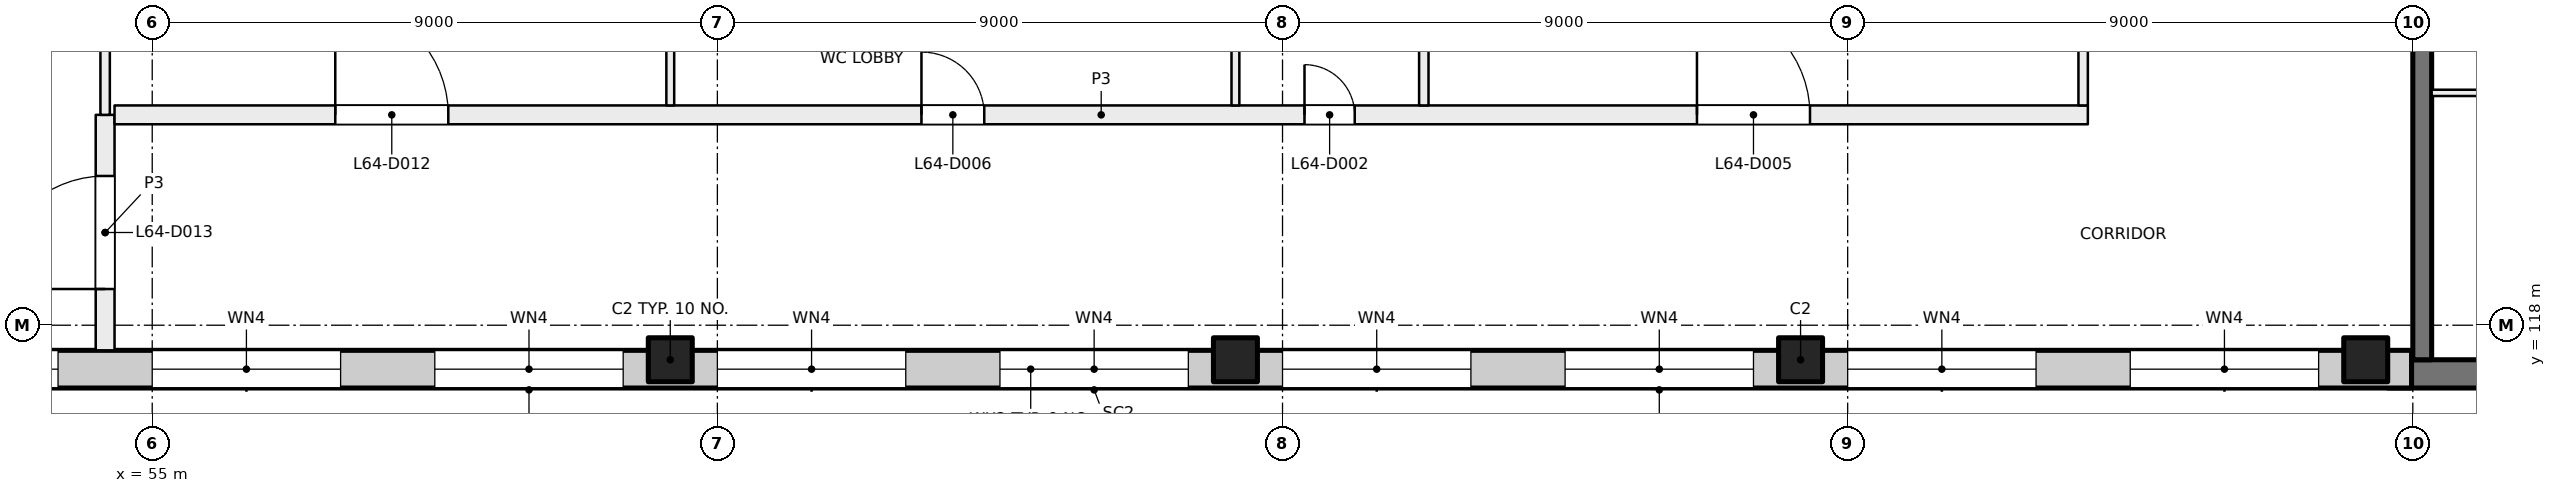
"""IFC4 building model, lengths in metres.
Left out: names, types, materials, properties, quantities, classifications, styles, units other than length and angle.
Written with IfcOpenShell. Run it as: python <this file> out.ifc"""

import sys

from ifc_helpers import new_model, si_unit, direction, frame, frame_2d, origin, origin_2d, place, context, subcontext, project, spatial, rectangle, extrude, element, fill, save


model = new_model("IFC4")
c1 = context("Model", 3, precision=1e-05, world=origin(), true_north=direction((0.0, 1.0)))
c2 = subcontext(c1, "Body", "Model", "MODEL_VIEW")
j1 = project(units=[si_unit("LENGTHUNIT", "METRE"), si_unit("PLANEANGLEUNIT", "RADIAN")], contexts=[c1])
p1 = place(None, origin())
s1 = spatial("IfcSite", under=j1, at=p1, CompositionType="ELEMENT")
p2 = place(p1, origin())
s2 = spatial("IfcBuilding", under=s1, at=p2, CompositionType="ELEMENT")
p3 = place(p2, frame((0.0, 0.0, 269.5)))
s3 = spatial("IfcBuildingStorey", under=s2, at=p3, CompositionType="ELEMENT", Elevation=269.5)
for number, where, z_axis, x_axis in (
    (1, (63.25, 117.45, 0.0), (0.0, 0.0, 1.0), (1.0, 0.0, 0.0)),
    (2, (72.25, 117.45, 0.0), (0.0, 0.0, 1.0), (1.0, 0.0, 0.0)),
    (3, (81.25, 117.45, 0.0), (0.0, 0.0, 1.0), (1.0, 0.0, 0.0)),
    (4, (90.25, 117.45, 0.0), (0.0, 0.0, 1.0), (1.0, 0.0, 0.0)),
):
    element("IfcColumn", number, at=place(p3, frame(where, z_axis=z_axis, x_axis=x_axis)), inside=s3, PredefinedType="COLUMN", context=c2, shape_type="SweptSolid", body=[
        extrude(rectangle(XDim=0.7, YDim=0.7, at=origin_2d()), origin(), (0.0, 0.0, 1.0), 4.0),
    ])
p4 = place(p3, frame((99.6, 117.225, 0.0), z_axis=(0.0, 0.0, 1.0), x_axis=(-1.0, 0.0, 0.0)))
e5 = element("IfcWall", 5, at=p4, inside=s3, PredefinedType="SHEAR", context=c2, shape_type="SweptSolid", body=[
    extrude(rectangle(XDim=9.0, YDim=0.45, at=frame_2d((4.5, 0.0))), origin(), (0.0, 0.0, 1.0), 4.0),
])
p5 = place(p3, frame((91.15, 126.2, 0.0), z_axis=(0.0, 0.0, 1.0), x_axis=(0.0, -1.0, 0.0)))
e6 = element("IfcWall", 6, at=p5, inside=s3, PredefinedType="SHEAR", context=c2, shape_type="SweptSolid", body=[
    extrude(rectangle(XDim=8.75, YDim=0.3, at=frame_2d((4.375, 0.0))), origin(), (0.0, 0.0, 1.0), 4.0),
])
p6 = place(p3, frame((90.98, 117.3, 0.0), z_axis=(0.0, 0.0, 1.0), x_axis=(-1.0, 0.0, 0.0)))
e7 = element("IfcWall", 7, at=p6, inside=s3, PredefinedType="SOLIDWALL", context=c2, shape_type="SweptSolid", body=[
    extrude(rectangle(XDim=43.98, YDim=0.6, at=frame_2d((21.99, 0.0))), origin(), (0.0, 0.0, 1.0), 3.625),
])
p7 = place(p6, frame((1.48, 0.0, 0.9)))
e8 = element("IfcOpeningElement", 8, at=p7, cuts=e7, PredefinedType="OPENING", context=c2, shape_type="SweptSolid", body=[
    extrude(rectangle(XDim=3.0, YDim=2.4, at=frame_2d((1.5, 1.2))), frame((0.0, 0.31, 0.0), z_axis=(0.0, -1.0, 0.0), x_axis=(1.0, 0.0, 0.0)), (0.0, 0.0, 1.0), 0.62),
])
p8 = place(p6, frame((5.98, 0.0, 0.9)))
e9 = element("IfcOpeningElement", 9, at=p8, cuts=e7, PredefinedType="OPENING", context=c2, shape_type="SweptSolid", body=[
    extrude(rectangle(XDim=3.0, YDim=2.4, at=frame_2d((1.5, 1.2))), frame((0.0, 0.31, 0.0), z_axis=(0.0, -1.0, 0.0), x_axis=(1.0, 0.0, 0.0)), (0.0, 0.0, 1.0), 0.62),
])
p9 = place(p6, frame((10.48, 0.0, 0.9)))
e10 = element("IfcOpeningElement", 10, at=p9, cuts=e7, PredefinedType="OPENING", context=c2, shape_type="SweptSolid", body=[
    extrude(rectangle(XDim=3.0, YDim=2.4, at=frame_2d((1.5, 1.2))), frame((0.0, 0.31, 0.0), z_axis=(0.0, -1.0, 0.0), x_axis=(1.0, 0.0, 0.0)), (0.0, 0.0, 1.0), 0.62),
])
p10 = place(p6, frame((14.98, 0.0, 0.9)))
e11 = element("IfcOpeningElement", 11, at=p10, cuts=e7, PredefinedType="OPENING", context=c2, shape_type="SweptSolid", body=[
    extrude(rectangle(XDim=3.0, YDim=2.4, at=frame_2d((1.5, 1.2))), frame((0.0, 0.31, 0.0), z_axis=(0.0, -1.0, 0.0), x_axis=(1.0, 0.0, 0.0)), (0.0, 0.0, 1.0), 0.62),
])
p11 = place(p6, frame((19.48, 0.0, 0.9)))
e12 = element("IfcOpeningElement", 12, at=p11, cuts=e7, PredefinedType="OPENING", context=c2, shape_type="SweptSolid", body=[
    extrude(rectangle(XDim=3.0, YDim=2.4, at=frame_2d((1.5, 1.2))), frame((0.0, 0.31, 0.0), z_axis=(0.0, -1.0, 0.0), x_axis=(1.0, 0.0, 0.0)), (0.0, 0.0, 1.0), 0.62),
])
p12 = place(p6, frame((23.98, 0.0, 0.9)))
e13 = element("IfcOpeningElement", 13, at=p12, cuts=e7, PredefinedType="OPENING", context=c2, shape_type="SweptSolid", body=[
    extrude(rectangle(XDim=3.0, YDim=2.4, at=frame_2d((1.5, 1.2))), frame((0.0, 0.31, 0.0), z_axis=(0.0, -1.0, 0.0), x_axis=(1.0, 0.0, 0.0)), (0.0, 0.0, 1.0), 0.62),
])
p13 = place(p6, frame((28.48, 0.0, 0.9)))
e14 = element("IfcOpeningElement", 14, at=p13, cuts=e7, PredefinedType="OPENING", context=c2, shape_type="SweptSolid", body=[
    extrude(rectangle(XDim=3.0, YDim=2.4, at=frame_2d((1.5, 1.2))), frame((0.0, 0.31, 0.0), z_axis=(0.0, -1.0, 0.0), x_axis=(1.0, 0.0, 0.0)), (0.0, 0.0, 1.0), 0.62),
])
p14 = place(p6, frame((32.98, 0.0, 0.9)))
e15 = element("IfcOpeningElement", 15, at=p14, cuts=e7, PredefinedType="OPENING", context=c2, shape_type="SweptSolid", body=[
    extrude(rectangle(XDim=3.0, YDim=2.4, at=frame_2d((1.5, 1.2))), frame((0.0, 0.31, 0.0), z_axis=(0.0, -1.0, 0.0), x_axis=(1.0, 0.0, 0.0)), (0.0, 0.0, 1.0), 0.62),
])
p15 = place(p6, frame((37.48, 0.0, 0.9)))
e16 = element("IfcOpeningElement", 16, at=p15, cuts=e7, PredefinedType="OPENING", context=c2, shape_type="SweptSolid", body=[
    extrude(rectangle(XDim=3.0, YDim=2.4, at=frame_2d((1.5, 1.2))), frame((0.0, 0.31, 0.0), z_axis=(0.0, -1.0, 0.0), x_axis=(1.0, 0.0, 0.0)), (0.0, 0.0, 1.0), 0.62),
])
p16 = place(p3, frame((93.4, 121.7, 0.0), z_axis=(0.0, 0.0, 1.0), x_axis=(-1.0, 0.0, 0.0)))
e17 = element("IfcWall", 17, at=p16, inside=s3, PredefinedType="PARTITIONING", context=c2, shape_type="SweptSolid", body=[
    extrude(rectangle(XDim=2.1, YDim=0.1, at=frame_2d((1.05, 0.0))), origin(), (0.0, 0.0, 1.0), 3.625),
])
p17 = place(p3, frame((54.25, 117.6, 0.0), z_axis=(0.0, 0.0, 1.0), x_axis=(0.0, 1.0, 0.0)))
e18 = element("IfcWall", 18, at=p17, inside=s3, PredefinedType="PARTITIONING", context=c2, shape_type="SweptSolid", body=[
    extrude(rectangle(XDim=3.75, YDim=0.3, at=frame_2d((1.875, 0.0))), origin(), (0.0, 0.0, 1.0), 3.625),
])
p18 = place(p17, frame((0.977, 0.0, 0.0)))
e19 = element("IfcOpeningElement", 19, at=p18, cuts=e18, PredefinedType="OPENING", context=c2, shape_type="SweptSolid", body=[
    extrude(rectangle(XDim=1.8, YDim=2.1, at=frame_2d((0.9, 1.05))), frame((0.0, 0.16, 0.0), z_axis=(0.0, -1.0, 0.0), x_axis=(1.0, 0.0, 0.0)), (0.0, 0.0, 1.0), 0.32),
])
p19 = place(p3, frame((54.4, 121.35, 0.0), z_axis=(0.0, 0.0, 1.0), x_axis=(1.0, 0.0, 0.0)))
e20 = element("IfcWall", 20, at=p19, inside=s3, PredefinedType="PARTITIONING", context=c2, shape_type="SweptSolid", body=[
    extrude(rectangle(XDim=31.425, YDim=0.3, at=frame_2d((15.712, 0.0))), origin(), (0.0, 0.0, 1.0), 3.625),
])
p20 = place(p19, frame((18.95, 0.0, 0.0)))
e21 = element("IfcOpeningElement", 21, at=p20, cuts=e20, PredefinedType="OPENING", context=c2, shape_type="SweptSolid", body=[
    extrude(rectangle(XDim=0.8, YDim=2.1, at=frame_2d((0.4, 1.05))), frame((0.0, 0.16, 0.0), z_axis=(0.0, -1.0, 0.0), x_axis=(1.0, 0.0, 0.0)), (0.0, 0.0, 1.0), 0.32),
])
p21 = place(p19, frame((25.2, 0.0, 0.0)))
e22 = element("IfcOpeningElement", 22, at=p21, cuts=e20, PredefinedType="OPENING", context=c2, shape_type="SweptSolid", body=[
    extrude(rectangle(XDim=1.8, YDim=2.1, at=frame_2d((0.9, 1.05))), frame((0.0, 0.16, 0.0), z_axis=(0.0, -1.0, 0.0), x_axis=(1.0, 0.0, 0.0)), (0.0, 0.0, 1.0), 0.32),
])
p22 = place(p19, frame((12.85, 0.0, 0.0)))
e23 = element("IfcOpeningElement", 23, at=p22, cuts=e20, PredefinedType="OPENING", context=c2, shape_type="SweptSolid", body=[
    extrude(rectangle(XDim=1.0, YDim=2.1, at=frame_2d((0.5, 1.05))), frame((0.0, 0.16, 0.0), z_axis=(0.0, -1.0, 0.0), x_axis=(1.0, 0.0, 0.0)), (0.0, 0.0, 1.0), 0.32),
])
p23 = place(p19, frame((3.515, 0.0, 0.0)))
e24 = element("IfcOpeningElement", 24, at=p23, cuts=e20, PredefinedType="OPENING", context=c2, shape_type="SweptSolid", body=[
    extrude(rectangle(XDim=1.8, YDim=2.1, at=frame_2d((0.9, 1.05))), frame((0.0, 0.16, 0.0), z_axis=(0.0, -1.0, 0.0), x_axis=(1.0, 0.0, 0.0)), (0.0, 0.0, 1.0), 0.32),
])
p24 = place(p3, frame((54.25, 138.4, 0.0), z_axis=(0.0, 0.0, 1.0), x_axis=(0.0, -1.0, 0.0)))
e25 = element("IfcWall", 25, at=p24, inside=s3, PredefinedType="PARTITIONING", context=c2, shape_type="SweptSolid", body=[
    extrude(rectangle(XDim=17.05, YDim=0.15, at=frame_2d((8.525, 0.0))), origin(), (0.0, 0.0, 1.0), 3.625),
])
p25 = place(p3, frame((63.25, 121.5, 0.0), z_axis=(0.0, 0.0, 1.0), x_axis=(0.0, 1.0, 0.0)))
e26 = element("IfcWall", 26, at=p25, inside=s3, PredefinedType="PARTITIONING", context=c2, shape_type="SweptSolid", body=[
    extrude(rectangle(XDim=4.438, YDim=0.125, at=frame_2d((2.219, 0.0))), origin(), (0.0, 0.0, 1.0), 3.625),
])
p26 = place(p3, frame((72.25, 126.0, 0.0), z_axis=(0.0, 0.0, 1.0), x_axis=(0.0, -1.0, 0.0)))
e27 = element("IfcWall", 27, at=p26, inside=s3, PredefinedType="PARTITIONING", context=c2, shape_type="SweptSolid", body=[
    extrude(rectangle(XDim=4.5, YDim=0.125, at=frame_2d((2.25, 0.0))), origin(), (0.0, 0.0, 1.0), 3.625),
])
p27 = place(p3, frame((75.25, 121.5, 0.0), z_axis=(0.0, 0.0, 1.0), x_axis=(0.0, 1.0, 0.0)))
e28 = element("IfcWall", 28, at=p27, inside=s3, PredefinedType="PARTITIONING", context=c2, shape_type="SweptSolid", body=[
    extrude(rectangle(XDim=4.575, YDim=0.15, at=frame_2d((2.288, 0.0))), origin(), (0.0, 0.0, 1.0), 3.625),
])
p28 = place(p3, frame((85.75, 121.5, 0.0), z_axis=(0.0, 0.0, 1.0), x_axis=(0.0, 1.0, 0.0)))
e29 = element("IfcWall", 29, at=p28, inside=s3, PredefinedType="PARTITIONING", context=c2, shape_type="SweptSolid", body=[
    extrude(rectangle(XDim=8.45, YDim=0.15, at=frame_2d((4.225, 0.0))), origin(), (0.0, 0.0, 1.0), 3.625),
])
p29 = place(p7, origin())
e30 = element("IfcWindow", 30, at=p29, inside=s3, PartitioningType="SINGLE_PANEL", PredefinedType="WINDOW", context=c2, shape_type="SweptSolid", body=[
    extrude(rectangle(XDim=3.0, YDim=2.4, at=frame_2d((1.5, 1.2))), frame((0.0, 0.03, 0.0), z_axis=(0.0, -1.0, 0.0), x_axis=(1.0, 0.0, 0.0)), (0.0, 0.0, 1.0), 0.06),
])
fill(e8, e30)
p30 = place(p8, origin())
e31 = element("IfcWindow", 31, at=p30, inside=s3, PartitioningType="SINGLE_PANEL", PredefinedType="WINDOW", context=c2, shape_type="SweptSolid", body=[
    extrude(rectangle(XDim=3.0, YDim=2.4, at=frame_2d((1.5, 1.2))), frame((0.0, 0.03, 0.0), z_axis=(0.0, -1.0, 0.0), x_axis=(1.0, 0.0, 0.0)), (0.0, 0.0, 1.0), 0.06),
])
fill(e9, e31)
p31 = place(p9, origin())
e32 = element("IfcWindow", 32, at=p31, inside=s3, PartitioningType="SINGLE_PANEL", PredefinedType="WINDOW", context=c2, shape_type="SweptSolid", body=[
    extrude(rectangle(XDim=3.0, YDim=2.4, at=frame_2d((1.5, 1.2))), frame((0.0, 0.03, 0.0), z_axis=(0.0, -1.0, 0.0), x_axis=(1.0, 0.0, 0.0)), (0.0, 0.0, 1.0), 0.06),
])
fill(e10, e32)
p32 = place(p10, origin())
e33 = element("IfcWindow", 33, at=p32, inside=s3, PartitioningType="SINGLE_PANEL", PredefinedType="WINDOW", context=c2, shape_type="SweptSolid", body=[
    extrude(rectangle(XDim=3.0, YDim=2.4, at=frame_2d((1.5, 1.2))), frame((0.0, 0.03, 0.0), z_axis=(0.0, -1.0, 0.0), x_axis=(1.0, 0.0, 0.0)), (0.0, 0.0, 1.0), 0.06),
])
fill(e11, e33)
p33 = place(p11, origin())
e34 = element("IfcWindow", 34, at=p33, inside=s3, PartitioningType="SINGLE_PANEL", PredefinedType="WINDOW", context=c2, shape_type="SweptSolid", body=[
    extrude(rectangle(XDim=3.0, YDim=2.4, at=frame_2d((1.5, 1.2))), frame((0.0, 0.03, 0.0), z_axis=(0.0, -1.0, 0.0), x_axis=(1.0, 0.0, 0.0)), (0.0, 0.0, 1.0), 0.06),
])
fill(e12, e34)
p34 = place(p12, origin())
e35 = element("IfcWindow", 35, at=p34, inside=s3, PartitioningType="SINGLE_PANEL", PredefinedType="WINDOW", context=c2, shape_type="SweptSolid", body=[
    extrude(rectangle(XDim=3.0, YDim=2.4, at=frame_2d((1.5, 1.2))), frame((0.0, 0.03, 0.0), z_axis=(0.0, -1.0, 0.0), x_axis=(1.0, 0.0, 0.0)), (0.0, 0.0, 1.0), 0.06),
])
fill(e13, e35)
p35 = place(p13, origin())
e36 = element("IfcWindow", 36, at=p35, inside=s3, PartitioningType="SINGLE_PANEL", PredefinedType="WINDOW", context=c2, shape_type="SweptSolid", body=[
    extrude(rectangle(XDim=3.0, YDim=2.4, at=frame_2d((1.5, 1.2))), frame((0.0, 0.03, 0.0), z_axis=(0.0, -1.0, 0.0), x_axis=(1.0, 0.0, 0.0)), (0.0, 0.0, 1.0), 0.06),
])
fill(e14, e36)
p36 = place(p14, origin())
e37 = element("IfcWindow", 37, at=p36, inside=s3, PartitioningType="SINGLE_PANEL", PredefinedType="WINDOW", context=c2, shape_type="SweptSolid", body=[
    extrude(rectangle(XDim=3.0, YDim=2.4, at=frame_2d((1.5, 1.2))), frame((0.0, 0.03, 0.0), z_axis=(0.0, -1.0, 0.0), x_axis=(1.0, 0.0, 0.0)), (0.0, 0.0, 1.0), 0.06),
])
fill(e15, e37)
p37 = place(p15, origin())
e38 = element("IfcWindow", 38, at=p37, inside=s3, PartitioningType="SINGLE_PANEL", PredefinedType="WINDOW", context=c2, shape_type="SweptSolid", body=[
    extrude(rectangle(XDim=3.0, YDim=2.4, at=frame_2d((1.5, 1.2))), frame((0.0, 0.03, 0.0), z_axis=(0.0, -1.0, 0.0), x_axis=(1.0, 0.0, 0.0)), (0.0, 0.0, 1.0), 0.06),
])
fill(e16, e38)
p38 = place(p20, origin())
e39 = element("IfcDoor", 39, at=p38, inside=s3, OperationType="SINGLE_SWING_LEFT", PredefinedType="DOOR", context=c2, shape_type="SweptSolid", body=[
    extrude(rectangle(XDim=0.8, YDim=2.1, at=frame_2d((0.4, 1.05))), frame((0.0, 0.025, 0.0), z_axis=(0.0, -1.0, 0.0), x_axis=(1.0, 0.0, 0.0)), (0.0, 0.0, 1.0), 0.05),
])
fill(e21, e39)
p39 = place(p21, origin())
e40 = element("IfcDoor", 40, at=p39, inside=s3, OperationType="DOUBLE_DOOR_SINGLE_SWING", PredefinedType="DOOR", context=c2, shape_type="SweptSolid", body=[
    extrude(rectangle(XDim=1.8, YDim=2.1, at=frame_2d((0.9, 1.05))), frame((0.0, 0.025, 0.0), z_axis=(0.0, -1.0, 0.0), x_axis=(1.0, 0.0, 0.0)), (0.0, 0.0, 1.0), 0.05),
])
fill(e22, e40)
p40 = place(p22, origin())
e41 = element("IfcDoor", 41, at=p40, inside=s3, OperationType="SINGLE_SWING_LEFT", PredefinedType="DOOR", context=c2, shape_type="SweptSolid", body=[
    extrude(rectangle(XDim=1.0, YDim=2.1, at=frame_2d((0.5, 1.05))), frame((0.0, 0.025, 0.0), z_axis=(0.0, -1.0, 0.0), x_axis=(1.0, 0.0, 0.0)), (0.0, 0.0, 1.0), 0.05),
])
fill(e23, e41)
p41 = place(p23, origin())
e42 = element("IfcDoor", 42, at=p41, inside=s3, OperationType="DOUBLE_DOOR_SINGLE_SWING", PredefinedType="DOOR", context=c2, shape_type="SweptSolid", body=[
    extrude(rectangle(XDim=1.8, YDim=2.1, at=frame_2d((0.9, 1.05))), frame((0.0, 0.025, 0.0), z_axis=(0.0, -1.0, 0.0), x_axis=(1.0, 0.0, 0.0)), (0.0, 0.0, 1.0), 0.05),
])
fill(e24, e42)
p42 = place(p18, origin())
e43 = element("IfcDoor", 43, at=p42, inside=s3, OperationType="DOUBLE_DOOR_SINGLE_SWING", PredefinedType="DOOR", context=c2, shape_type="SweptSolid", body=[
    extrude(rectangle(XDim=1.8, YDim=2.1, at=frame_2d((0.9, 1.05))), frame((0.0, 0.025, 0.0), z_axis=(0.0, -1.0, 0.0), x_axis=(1.0, 0.0, 0.0)), (0.0, 0.0, 1.0), 0.05),
])
fill(e19, e43)
save(model, sys.argv[1])
